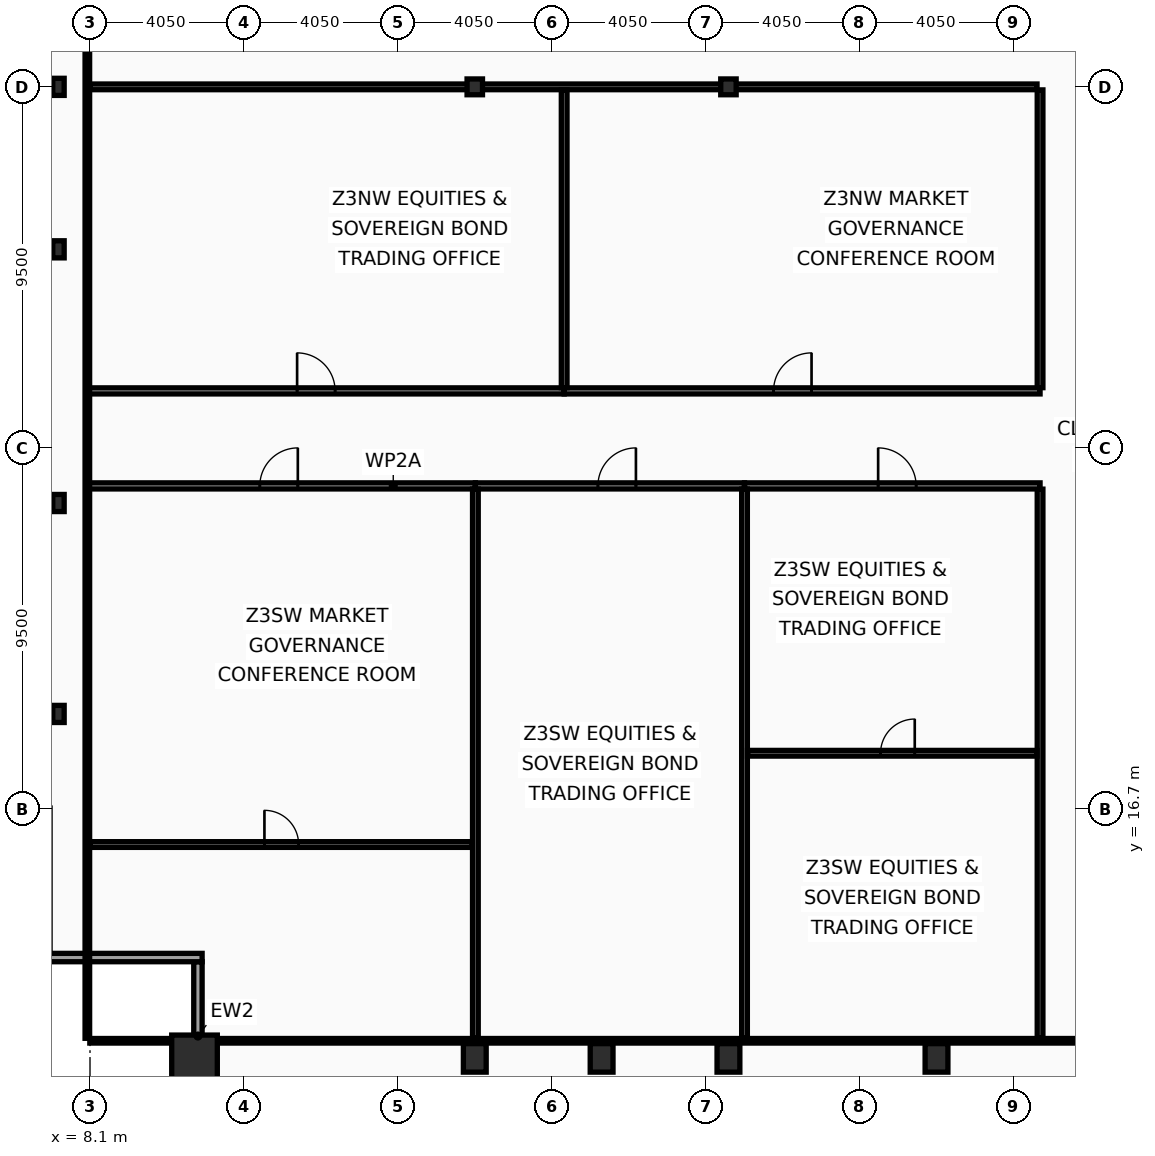
"""IFC4 building model, lengths in metres.
Left out: names, types, materials, properties, quantities, classifications, styles, units other than length and angle.
Written with IfcOpenShell. Run it as: python <this file> out.ifc"""

import sys

from ifc_helpers import new_model, si_unit, direction, frame, frame_2d, origin, origin_2d, place, context, subcontext, project, spatial, rectangle, hollow_rectangle, i_section, extrude, element, fill, save


model = new_model("IFC4")
c1 = context("Model", 3, precision=1e-05, world=origin(), true_north=direction((0.0, 1.0)))
c2 = subcontext(c1, "Body", "Model", "MODEL_VIEW")
j1 = project(units=[si_unit("LENGTHUNIT", "METRE"), si_unit("PLANEANGLEUNIT", "RADIAN")], contexts=[c1])
p1 = place(None, origin())
s1 = spatial("IfcSite", under=j1, at=p1, CompositionType="ELEMENT")
p2 = place(p1, origin())
s2 = spatial("IfcBuilding", under=s1, at=p2, CompositionType="ELEMENT")
p3 = place(p2, frame((0.0, 0.0, 231.8)))
s3 = spatial("IfcBuildingStorey", under=s2, at=p3, CompositionType="ELEMENT", Elevation=231.8)
p4 = place(p3, frame((10.85, 10.15, 0.0), z_axis=(0.0, 0.0, 1.0), x_axis=(1.0, 0.0, 0.0)))
e1 = element("IfcColumn", 1, at=p4, inside=s3, PredefinedType="COLUMN", context=c2, shape_type="SweptSolid", body=[
    extrude(hollow_rectangle(XDim=1.2, YDim=1.2, WallThickness=0.06, at=origin_2d()), origin(), (0.0, 0.0, 1.0), 3.6),
])
for number, where, z_axis, x_axis in (
    (2, (18.225, 10.15, 0.0), (0.0, 0.0, 1.0), (1.0, 0.0, 0.0)),
    (3, (21.562, 10.15, 0.0), (0.0, 0.0, 1.0), (1.0, 0.0, 0.0)),
    (4, (24.9, 10.15, 0.0), (0.0, 0.0, 1.0), (1.0, 0.0, 0.0)),
    (5, (30.375, 10.15, 0.0), (0.0, 0.0, 1.0), (1.0, 0.0, 0.0)),
):
    element("IfcColumn", number, at=place(p3, frame(where, z_axis=z_axis, x_axis=x_axis)), inside=s3, PredefinedType="COLUMN", context=c2, shape_type="SweptSolid", body=[
        extrude(hollow_rectangle(XDim=0.6, YDim=0.75, WallThickness=0.045, at=origin_2d()), origin(), (0.0, 0.0, 1.0), 3.6),
    ])
for number, where, z_axis, x_axis in (
    (6, (7.27, 19.2, 0.0), (0.0, 0.0, 1.0), (1.0, 0.0, 0.0)),
    (7, (7.27, 24.75, 0.0), (0.0, 0.0, 1.0), (1.0, 0.0, 0.0)),
    (8, (7.27, 31.425, 0.0), (0.0, 0.0, 1.0), (1.0, 0.0, 0.0)),
    (9, (7.27, 35.7, 0.0), (0.0, 0.0, 1.0), (1.0, 0.0, 0.0)),
):
    element("IfcColumn", number, at=place(p3, frame(where, z_axis=z_axis, x_axis=x_axis)), inside=s3, PredefinedType="COLUMN", context=c2, shape_type="SweptSolid", body=[
        extrude(i_section(OverallWidth=0.3, OverallDepth=0.45, WebThickness=0.014, FlangeThickness=0.026, at=origin_2d()), origin(), (0.0, 0.0, 1.0), 3.6),
    ])
for number, where, z_axis, x_axis in (
    (10, (18.225, 35.7, 0.0), (0.0, 0.0, 1.0), (1.0, 0.0, 0.0)),
    (11, (24.9, 35.7, 0.0), (0.0, 0.0, 1.0), (1.0, 0.0, 0.0)),
):
    element("IfcColumn", number, at=place(p3, frame(where, z_axis=z_axis, x_axis=x_axis)), inside=s3, PredefinedType="COLUMN", context=c2, shape_type="SweptSolid", body=[
        extrude(i_section(OverallWidth=0.406, OverallDepth=0.416, WebThickness=0.03, FlangeThickness=0.048, at=origin_2d()), origin(), (0.0, 0.0, 1.0), 3.6),
    ])
p5 = place(p3, frame((10.94, 8.77, 0.0), z_axis=(0.0, 0.0, 1.0), x_axis=(0.0, 1.0, 0.0)))
e12 = element("IfcWall", 12, at=p5, inside=s3, PredefinedType="SOLIDWALL", context=c2, shape_type="SweptSolid", body=[
    extrude(rectangle(XDim=3.91, YDim=0.22, at=frame_2d((1.955, 0.0))), origin(), (0.0, 0.0, 1.0), 2.83),
])
p6 = place(p3, frame((11.05, 12.79, 0.0), z_axis=(0.0, 0.0, 1.0), x_axis=(-1.0, 0.0, 0.0)))
e13 = element("IfcWall", 13, at=p6, inside=s3, PredefinedType="SOLIDWALL", context=c2, shape_type="SweptSolid", body=[
    extrude(rectangle(XDim=4.22, YDim=0.22, at=frame_2d((2.11, 0.0))), origin(), (0.0, 0.0, 1.0), 2.83),
])
p7 = place(p3, frame((33.1, 10.665, 0.0), z_axis=(0.0, 0.0, 1.0), x_axis=(0.0, 1.0, 0.0)))
e14 = element("IfcWall", 14, at=p7, inside=s3, PredefinedType="PARTITIONING", context=c2, shape_type="SweptSolid", body=[
    extrude(rectangle(XDim=14.45, YDim=0.15, at=frame_2d((7.225, 0.0))), origin(), (0.0, 0.0, 1.0), 2.98),
])
p8 = place(p3, frame((33.1, 27.785, 0.0), z_axis=(0.0, 0.0, 1.0), x_axis=(0.0, 1.0, 0.0)))
e15 = element("IfcWall", 15, at=p8, inside=s3, PredefinedType="PARTITIONING", context=c2, shape_type="SweptSolid", body=[
    extrude(rectangle(XDim=7.835, YDim=0.15, at=frame_2d((3.917, 0.0))), origin(), (0.0, 0.0, 1.0), 2.98),
])
p9 = place(p3, frame((8.095, 35.7, 0.0), z_axis=(0.0, 0.0, 1.0), x_axis=(1.0, 0.0, 0.0)))
e16 = element("IfcWall", 16, at=p9, inside=s3, PredefinedType="PARTITIONING", context=c2, shape_type="SweptSolid", body=[
    extrude(rectangle(XDim=24.925, YDim=0.15, at=frame_2d((12.462, 0.0))), origin(), (0.0, 0.0, 1.0), 2.78),
])
p10 = place(p3, frame((8.03, 25.2, 0.0), z_axis=(0.0, 0.0, 1.0), x_axis=(1.0, 0.0, 0.0)))
e17 = element("IfcWall", 17, at=p10, inside=s3, PredefinedType="PARTITIONING", context=c2, shape_type="SweptSolid", body=[
    extrude(rectangle(XDim=10.211, YDim=0.16, at=frame_2d((5.105, 0.0))), origin(), (0.0, 0.0, 1.0), 2.78),
])
p11 = place(p10, frame((4.539, 0.0, 0.0)))
e18 = element("IfcOpeningElement", 18, at=p11, cuts=e17, PredefinedType="OPENING", context=c2, shape_type="SweptSolid", body=[
    extrude(rectangle(XDim=1.0, YDim=2.05, at=frame_2d((0.5, 1.025))), frame((0.0, 0.09, 0.0), z_axis=(0.0, -1.0, 0.0), x_axis=(1.0, 0.0, 0.0)), (0.0, 0.0, 1.0), 0.18),
])
p12 = place(p3, frame((8.095, 15.764, 0.0), z_axis=(0.0, 0.0, 1.0), x_axis=(1.0, 0.0, 0.0)))
e19 = element("IfcWall", 19, at=p12, inside=s3, PredefinedType="PARTITIONING", context=c2, shape_type="SweptSolid", body=[
    extrude(rectangle(XDim=10.066, YDim=0.15, at=frame_2d((5.033, 0.0))), origin(), (0.0, 0.0, 1.0), 2.78),
])
p13 = place(p12, frame((4.595, 0.0, 0.0)))
e20 = element("IfcOpeningElement", 20, at=p13, cuts=e19, PredefinedType="OPENING", context=c2, shape_type="SweptSolid", body=[
    extrude(rectangle(XDim=0.9, YDim=2.05, at=frame_2d((0.45, 1.025))), frame((0.0, 0.085, 0.0), z_axis=(0.0, -1.0, 0.0), x_axis=(1.0, 0.0, 0.0)), (0.0, 0.0, 1.0), 0.17),
])
p14 = place(p3, frame((18.241, 25.2, 0.0), z_axis=(0.0, 0.0, 1.0), x_axis=(1.0, 0.0, 0.0)))
e21 = element("IfcWall", 21, at=p14, inside=s3, PredefinedType="PARTITIONING", context=c2, shape_type="SweptSolid", body=[
    extrude(rectangle(XDim=7.082, YDim=0.16, at=frame_2d((3.541, 0.0))), origin(), (0.0, 0.0, 1.0), 2.78),
])
p15 = place(p14, frame((3.224, 0.0, 0.0)))
e22 = element("IfcOpeningElement", 22, at=p15, cuts=e21, PredefinedType="OPENING", context=c2, shape_type="SweptSolid", body=[
    extrude(rectangle(XDim=1.0, YDim=2.05, at=frame_2d((0.5, 1.025))), frame((0.0, 0.09, 0.0), z_axis=(0.0, -1.0, 0.0), x_axis=(1.0, 0.0, 0.0)), (0.0, 0.0, 1.0), 0.18),
])
p16 = place(p3, frame((18.241, 10.665, 0.0), z_axis=(0.0, 0.0, 1.0), x_axis=(0.0, 1.0, 0.0)))
e23 = element("IfcWall", 23, at=p16, inside=s3, PredefinedType="PARTITIONING", context=c2, shape_type="SweptSolid", body=[
    extrude(rectangle(XDim=14.45, YDim=0.15, at=frame_2d((7.225, 0.0))), origin(), (0.0, 0.0, 1.0), 2.78),
])
p17 = place(p3, frame((25.323, 25.2, 0.0), z_axis=(0.0, 0.0, 1.0), x_axis=(1.0, 0.0, 0.0)))
e24 = element("IfcWall", 24, at=p17, inside=s3, PredefinedType="PARTITIONING", context=c2, shape_type="SweptSolid", body=[
    extrude(rectangle(XDim=7.777, YDim=0.16, at=frame_2d((3.889, 0.0))), origin(), (0.0, 0.0, 1.0), 2.78),
])
p18 = place(p17, frame((3.516, 0.0, 0.0)))
e25 = element("IfcOpeningElement", 25, at=p18, cuts=e24, PredefinedType="OPENING", context=c2, shape_type="SweptSolid", body=[
    extrude(rectangle(XDim=1.0, YDim=2.05, at=frame_2d((0.5, 1.025))), frame((0.0, 0.09, 0.0), z_axis=(0.0, -1.0, 0.0), x_axis=(1.0, 0.0, 0.0)), (0.0, 0.0, 1.0), 0.18),
])
p19 = place(p3, frame((25.323, 10.665, 0.0), z_axis=(0.0, 0.0, 1.0), x_axis=(0.0, 1.0, 0.0)))
e26 = element("IfcWall", 26, at=p19, inside=s3, PredefinedType="PARTITIONING", context=c2, shape_type="SweptSolid", body=[
    extrude(rectangle(XDim=14.45, YDim=0.15, at=frame_2d((7.225, 0.0))), origin(), (0.0, 0.0, 1.0), 2.78),
])
p20 = place(p3, frame((25.403, 18.166, 0.0), z_axis=(0.0, 0.0, 1.0), x_axis=(1.0, 0.0, 0.0)))
e27 = element("IfcWall", 27, at=p20, inside=s3, PredefinedType="PARTITIONING", context=c2, shape_type="SweptSolid", body=[
    extrude(rectangle(XDim=7.617, YDim=0.15, at=frame_2d((3.809, 0.0))), origin(), (0.0, 0.0, 1.0), 2.78),
])
p21 = place(p20, frame((3.5, 0.0, 0.0)))
e28 = element("IfcOpeningElement", 28, at=p21, cuts=e27, PredefinedType="OPENING", context=c2, shape_type="SweptSolid", body=[
    extrude(rectangle(XDim=0.9, YDim=2.05, at=frame_2d((0.45, 1.025))), frame((0.0, 0.085, 0.0), z_axis=(0.0, -1.0, 0.0), x_axis=(1.0, 0.0, 0.0)), (0.0, 0.0, 1.0), 0.17),
])
p22 = place(p3, frame((8.03, 27.7, 0.0), z_axis=(0.0, 0.0, 1.0), x_axis=(1.0, 0.0, 0.0)))
e29 = element("IfcWall", 29, at=p22, inside=s3, PredefinedType="PARTITIONING", context=c2, shape_type="SweptSolid", body=[
    extrude(rectangle(XDim=12.547, YDim=0.16, at=frame_2d((6.273, 0.0))), origin(), (0.0, 0.0, 1.0), 2.78),
])
p23 = place(p22, frame((5.52, 0.0, 0.0)))
e30 = element("IfcOpeningElement", 30, at=p23, cuts=e29, PredefinedType="OPENING", context=c2, shape_type="SweptSolid", body=[
    extrude(rectangle(XDim=1.0, YDim=2.05, at=frame_2d((0.5, 1.025))), frame((0.0, 0.09, 0.0), z_axis=(0.0, -1.0, 0.0), x_axis=(1.0, 0.0, 0.0)), (0.0, 0.0, 1.0), 0.18),
])
p24 = place(p3, frame((20.577, 27.7, 0.0), z_axis=(0.0, 0.0, 1.0), x_axis=(1.0, 0.0, 0.0)))
e31 = element("IfcWall", 31, at=p24, inside=s3, PredefinedType="PARTITIONING", context=c2, shape_type="SweptSolid", body=[
    extrude(rectangle(XDim=12.523, YDim=0.16, at=frame_2d((6.261, 0.0))), origin(), (0.0, 0.0, 1.0), 2.78),
])
p25 = place(p24, frame((5.51, 0.0, 0.0)))
e32 = element("IfcOpeningElement", 32, at=p25, cuts=e31, PredefinedType="OPENING", context=c2, shape_type="SweptSolid", body=[
    extrude(rectangle(XDim=1.0, YDim=2.05, at=frame_2d((0.5, 1.025))), frame((0.0, 0.09, 0.0), z_axis=(0.0, -1.0, 0.0), x_axis=(1.0, 0.0, 0.0)), (0.0, 0.0, 1.0), 0.18),
])
p26 = place(p3, frame((20.577, 27.785, 0.0), z_axis=(0.0, 0.0, 1.0), x_axis=(0.0, 1.0, 0.0)))
e33 = element("IfcWall", 33, at=p26, inside=s3, PredefinedType="PARTITIONING", context=c2, shape_type="SweptSolid", body=[
    extrude(rectangle(XDim=7.835, YDim=0.15, at=frame_2d((3.917, 0.0))), origin(), (0.0, 0.0, 1.0), 2.98),
])
p27 = place(p3, frame((8.03, 10.665, 0.0), z_axis=(0.0, 0.0, 1.0), x_axis=(0.0, 1.0, 0.0)))
e34 = element("IfcWall", 34, at=p27, inside=s3, PredefinedType="PARTITIONING", context=c2, shape_type="SweptSolid", body=[
    extrude(rectangle(XDim=42.11, YDim=0.12, at=frame_2d((21.055, 0.0))), origin(), (0.0, 0.0, 1.0), 2.78),
])
p28 = place(p3, frame((8.095, 10.6, 0.0), z_axis=(0.0, 0.0, 1.0), x_axis=(1.0, 0.0, 0.0)))
e35 = element("IfcWall", 35, at=p28, inside=s3, PredefinedType="PARTITIONING", context=c2, shape_type="SweptSolid", body=[
    extrude(rectangle(XDim=56.71, YDim=0.12, at=frame_2d((28.355, 0.0))), origin(), (0.0, 0.0, 1.0), 2.78),
])
p29 = place(p11, origin())
e36 = element("IfcDoor", 36, at=p29, inside=s3, OperationType="SINGLE_SWING_RIGHT", PredefinedType="DOOR", context=c2, shape_type="SweptSolid", body=[
    extrude(rectangle(XDim=1.0, YDim=2.05, at=frame_2d((0.5, 1.025))), frame((0.0, 0.025, 0.0), z_axis=(0.0, -1.0, 0.0), x_axis=(1.0, 0.0, 0.0)), (0.0, 0.0, 1.0), 0.05),
])
fill(e18, e36)
p30 = place(p13, origin())
e37 = element("IfcDoor", 37, at=p30, inside=s3, OperationType="SINGLE_SWING_LEFT", PredefinedType="DOOR", context=c2, shape_type="SweptSolid", body=[
    extrude(rectangle(XDim=0.9, YDim=2.05, at=frame_2d((0.45, 1.025))), frame((0.0, 0.025, 0.0), z_axis=(0.0, -1.0, 0.0), x_axis=(1.0, 0.0, 0.0)), (0.0, 0.0, 1.0), 0.05),
])
fill(e20, e37)
p31 = place(p15, origin())
e38 = element("IfcDoor", 38, at=p31, inside=s3, OperationType="SINGLE_SWING_RIGHT", PredefinedType="DOOR", context=c2, shape_type="SweptSolid", body=[
    extrude(rectangle(XDim=1.0, YDim=2.05, at=frame_2d((0.5, 1.025))), frame((0.0, 0.025, 0.0), z_axis=(0.0, -1.0, 0.0), x_axis=(1.0, 0.0, 0.0)), (0.0, 0.0, 1.0), 0.05),
])
fill(e22, e38)
p32 = place(p18, origin())
e39 = element("IfcDoor", 39, at=p32, inside=s3, OperationType="SINGLE_SWING_LEFT", PredefinedType="DOOR", context=c2, shape_type="SweptSolid", body=[
    extrude(rectangle(XDim=1.0, YDim=2.05, at=frame_2d((0.5, 1.025))), frame((0.0, 0.025, 0.0), z_axis=(0.0, -1.0, 0.0), x_axis=(1.0, 0.0, 0.0)), (0.0, 0.0, 1.0), 0.05),
])
fill(e25, e39)
p33 = place(p21, origin())
e40 = element("IfcDoor", 40, at=p33, inside=s3, OperationType="SINGLE_SWING_RIGHT", PredefinedType="DOOR", context=c2, shape_type="SweptSolid", body=[
    extrude(rectangle(XDim=0.9, YDim=2.05, at=frame_2d((0.45, 1.025))), frame((0.0, 0.025, 0.0), z_axis=(0.0, -1.0, 0.0), x_axis=(1.0, 0.0, 0.0)), (0.0, 0.0, 1.0), 0.05),
])
fill(e28, e40)
p34 = place(p23, origin())
e41 = element("IfcDoor", 41, at=p34, inside=s3, OperationType="SINGLE_SWING_LEFT", PredefinedType="DOOR", context=c2, shape_type="SweptSolid", body=[
    extrude(rectangle(XDim=1.0, YDim=2.05, at=frame_2d((0.5, 1.025))), frame((0.0, 0.025, 0.0), z_axis=(0.0, -1.0, 0.0), x_axis=(1.0, 0.0, 0.0)), (0.0, 0.0, 1.0), 0.05),
])
fill(e30, e41)
p35 = place(p25, origin())
e42 = element("IfcDoor", 42, at=p35, inside=s3, OperationType="SINGLE_SWING_RIGHT", PredefinedType="DOOR", context=c2, shape_type="SweptSolid", body=[
    extrude(rectangle(XDim=1.0, YDim=2.05, at=frame_2d((0.5, 1.025))), frame((0.0, 0.025, 0.0), z_axis=(0.0, -1.0, 0.0), x_axis=(1.0, 0.0, 0.0)), (0.0, 0.0, 1.0), 0.05),
])
fill(e32, e42)
save(model, sys.argv[1])
